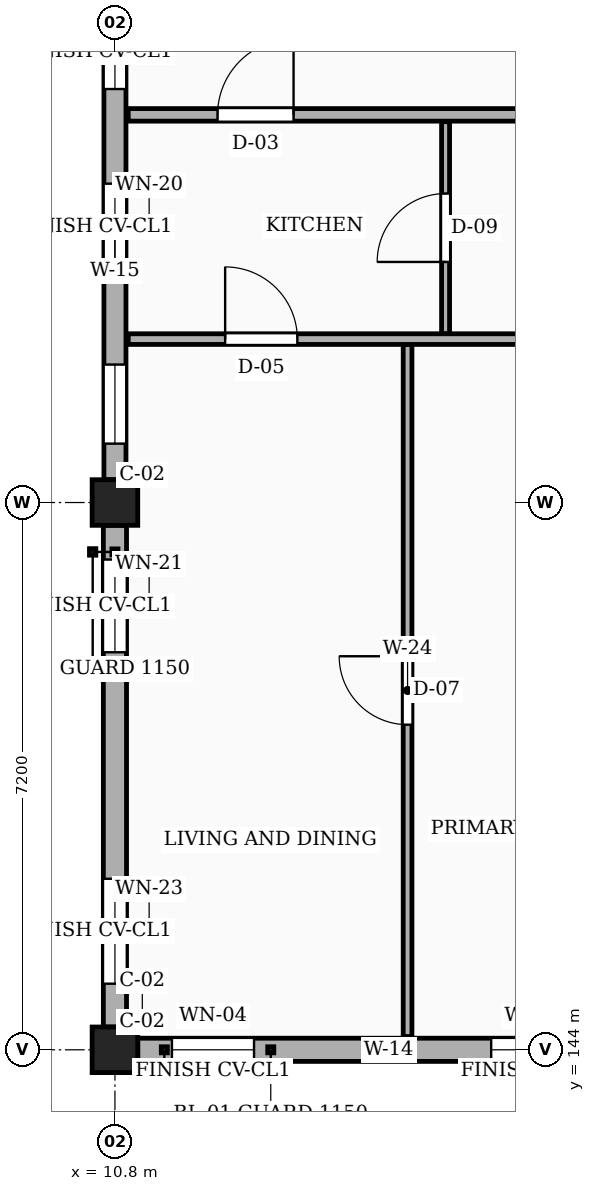
"""IFC4 building model, lengths in metres.
Left out: names, types, materials, properties, quantities, classifications, styles, units other than length and angle.
Written with IfcOpenShell. Run it as: python <this file> out.ifc"""

import sys

from ifc_helpers import new_model, si_unit, direction, frame, frame_2d, origin, origin_2d, place, context, subcontext, project, spatial, rectangle, extrude, element, fill, save


model = new_model("IFC4")
c1 = context("Model", 3, precision=1e-05, world=origin(), true_north=direction((0.0, 1.0)))
c2 = subcontext(c1, "Body", "Model", "MODEL_VIEW")
j1 = project(units=[si_unit("LENGTHUNIT", "METRE"), si_unit("PLANEANGLEUNIT", "RADIAN")], contexts=[c1])
p1 = place(None, origin())
s1 = spatial("IfcSite", under=j1, at=p1, CompositionType="ELEMENT")
p2 = place(p1, origin())
s2 = spatial("IfcBuilding", under=s1, at=p2, CompositionType="ELEMENT")
p3 = place(p2, frame((0.0, 0.0, 7.65)))
s3 = spatial("IfcBuildingStorey", under=s2, at=p3, CompositionType="ELEMENT", Elevation=7.65)
for number, where, z_axis, x_axis in (
    (1, (10.8, 144.0, 0.0), (0.0, 0.0, 1.0), (1.0, 0.0, 0.0)),
    (2, (10.8, 151.2, 0.0), (0.0, 0.0, 1.0), (1.0, 0.0, 0.0)),
):
    element("IfcColumn", number, at=place(p3, frame(where, z_axis=z_axis, x_axis=x_axis)), inside=s3, PredefinedType="COLUMN", context=c2, shape_type="SweptSolid", body=[
        extrude(rectangle(XDim=0.6, YDim=0.6, at=origin_2d()), origin(), (0.0, 0.0, 1.0), 3.15),
    ])
p4 = place(p3, frame((11.1, 144.0, 0.0), z_axis=(0.0, 0.0, 1.0), x_axis=(1.0, 0.0, 0.0)))
e3 = element("IfcWall", 3, at=p4, inside=s3, PredefinedType="SOLIDWALL", context=c2, shape_type="SweptSolid", body=[
    extrude(rectangle(XDim=6.6, YDim=0.305, at=frame_2d((3.3, 0.0))), origin(), (0.0, 0.0, 1.0), 2.455),
])
p5 = place(p4, frame((0.45, 0.0, 0.78)))
e4 = element("IfcOpeningElement", 4, at=p5, cuts=e3, PredefinedType="OPENING", context=c2, shape_type="SweptSolid", body=[
    extrude(rectangle(XDim=1.08, YDim=1.15, at=frame_2d((0.54, 0.575))), frame((0.0, 0.163, 0.0), z_axis=(0.0, -1.0, 0.0), x_axis=(1.0, 0.0, 0.0)), (0.0, 0.0, 1.0), 0.325),
])
p6 = place(p4, frame((4.65, 0.0, 0.78)))
e5 = element("IfcOpeningElement", 5, at=p6, cuts=e3, PredefinedType="OPENING", context=c2, shape_type="SweptSolid", body=[
    extrude(rectangle(XDim=1.24, YDim=1.15, at=frame_2d((0.62, 0.575))), frame((0.0, 0.163, 0.0), z_axis=(0.0, -1.0, 0.0), x_axis=(1.0, 0.0, 0.0)), (0.0, 0.0, 1.0), 0.325),
])
p7 = place(p3, frame((10.8, 158.1, 0.0), z_axis=(0.0, 0.0, 1.0), x_axis=(0.0, -1.0, 0.0)))
e6 = element("IfcWall", 6, at=p7, inside=s3, PredefinedType="SOLIDWALL", context=c2, shape_type="SweptSolid", body=[
    extrude(rectangle(XDim=6.6, YDim=0.29, at=frame_2d((3.3, 0.0))), origin(), (0.0, 0.0, 1.0), 2.455),
])
p8 = place(p7, frame((0.48, 0.0, 0.78)))
e7 = element("IfcOpeningElement", 7, at=p8, cuts=e6, PredefinedType="OPENING", context=c2, shape_type="SweptSolid", body=[
    extrude(rectangle(XDim=0.98, YDim=1.36, at=frame_2d((0.49, 0.68))), frame((0.0, 0.155, 0.0), z_axis=(0.0, -1.0, 0.0), x_axis=(1.0, 0.0, 0.0)), (0.0, 0.0, 1.0), 0.31),
])
p9 = place(p7, frame((2.705, 0.0, 0.78)))
e8 = element("IfcOpeningElement", 8, at=p9, cuts=e6, PredefinedType="OPENING", context=c2, shape_type="SweptSolid", body=[
    extrude(rectangle(XDim=1.14, YDim=1.36, at=frame_2d((0.57, 0.68))), frame((0.0, 0.155, 0.0), z_axis=(0.0, -1.0, 0.0), x_axis=(1.0, 0.0, 0.0)), (0.0, 0.0, 1.0), 0.31),
])
p10 = place(p7, frame((5.085, 0.0, 0.78)))
e9 = element("IfcOpeningElement", 9, at=p10, cuts=e6, PredefinedType="OPENING", context=c2, shape_type="SweptSolid", body=[
    extrude(rectangle(XDim=1.04, YDim=1.26, at=frame_2d((0.52, 0.63))), frame((0.0, 0.155, 0.0), z_axis=(0.0, -1.0, 0.0), x_axis=(1.0, 0.0, 0.0)), (0.0, 0.0, 1.0), 0.31),
])
p11 = place(p3, frame((10.8, 150.9, 0.0), z_axis=(0.0, 0.0, 1.0), x_axis=(0.0, -1.0, 0.0)))
e10 = element("IfcWall", 10, at=p11, inside=s3, PredefinedType="SOLIDWALL", context=c2, shape_type="SweptSolid", body=[
    extrude(rectangle(XDim=6.6, YDim=0.305, at=frame_2d((3.3, 0.0))), origin(), (0.0, 0.0, 1.0), 2.455),
])
p12 = place(p11, frame((0.45, 0.0, 0.78)))
e11 = element("IfcOpeningElement", 11, at=p12, cuts=e10, PredefinedType="OPENING", context=c2, shape_type="SweptSolid", body=[
    extrude(rectangle(XDim=1.22, YDim=1.36, at=frame_2d((0.61, 0.68))), frame((0.0, 0.163, 0.0), z_axis=(0.0, -1.0, 0.0), x_axis=(1.0, 0.0, 0.0)), (0.0, 0.0, 1.0), 0.325),
])
p13 = place(p11, frame((4.65, 0.0, 0.78)))
e12 = element("IfcOpeningElement", 12, at=p13, cuts=e10, PredefinedType="OPENING", context=c2, shape_type="SweptSolid", body=[
    extrude(rectangle(XDim=1.38, YDim=1.36, at=frame_2d((0.69, 0.68))), frame((0.0, 0.163, 0.0), z_axis=(0.0, -1.0, 0.0), x_axis=(1.0, 0.0, 0.0)), (0.0, 0.0, 1.0), 0.325),
])
p14 = place(p3, frame((10.975, 156.3, 0.0), z_axis=(0.0, 0.0, 1.0), x_axis=(1.0, 0.0, 0.0)))
e13 = element("IfcWall", 13, at=p14, inside=s3, PredefinedType="PARTITIONING", context=c2, shape_type="SweptSolid", body=[
    extrude(rectangle(XDim=7.005, YDim=0.165, at=frame_2d((3.502, 0.0))), origin(), (0.0, 0.0, 1.0), 2.32),
])
p15 = place(p14, frame((1.175, 0.0, 0.0)))
e14 = element("IfcOpeningElement", 14, at=p15, cuts=e13, PredefinedType="OPENING", context=c2, shape_type="SweptSolid", body=[
    extrude(rectangle(XDim=1.0, YDim=2.15, at=frame_2d((0.5, 1.075))), frame((0.0, 0.093, 0.0), z_axis=(0.0, -1.0, 0.0), x_axis=(1.0, 0.0, 0.0)), (0.0, 0.0, 1.0), 0.185),
])
p16 = place(p3, frame((14.65, 144.175, 0.0), z_axis=(0.0, 0.0, 1.0), x_axis=(0.0, 1.0, 0.0)))
e15 = element("IfcWall", 15, at=p16, inside=s3, PredefinedType="PARTITIONING", context=c2, shape_type="SweptSolid", body=[
    extrude(rectangle(XDim=9.105, YDim=0.115, at=frame_2d((4.552, 0.0))), origin(), (0.0, 0.0, 1.0), 2.32),
])
p17 = place(p16, frame((4.103, 0.0, 0.0)))
e16 = element("IfcOpeningElement", 16, at=p17, cuts=e15, PredefinedType="OPENING", context=c2, shape_type="SweptSolid", body=[
    extrude(rectangle(XDim=0.9, YDim=2.1, at=frame_2d((0.45, 1.05))), frame((0.0, 0.067, 0.0), z_axis=(0.0, -1.0, 0.0), x_axis=(1.0, 0.0, 0.0)), (0.0, 0.0, 1.0), 0.135),
])
p18 = place(p3, frame((15.15, 153.42, 0.0), z_axis=(0.0, 0.0, 1.0), x_axis=(0.0, 1.0, 0.0)))
e17 = element("IfcWall", 17, at=p18, inside=s3, PredefinedType="PARTITIONING", context=c2, shape_type="SweptSolid", body=[
    extrude(rectangle(XDim=2.79, YDim=0.105, at=frame_2d((1.395, 0.0))), origin(), (0.0, 0.0, 1.0), 2.32),
])
p19 = place(p18, frame((0.945, 0.0, 0.0)))
e18 = element("IfcOpeningElement", 18, at=p19, cuts=e17, PredefinedType="OPENING", context=c2, shape_type="SweptSolid", body=[
    extrude(rectangle(XDim=0.9, YDim=2.05, at=frame_2d((0.45, 1.025))), frame((0.0, 0.062, 0.0), z_axis=(0.0, -1.0, 0.0), x_axis=(1.0, 0.0, 0.0)), (0.0, 0.0, 1.0), 0.125),
])
p20 = place(p3, frame((10.975, 153.35, 0.0), z_axis=(0.0, 0.0, 1.0), x_axis=(1.0, 0.0, 0.0)))
e19 = element("IfcWall", 19, at=p20, inside=s3, PredefinedType="PARTITIONING", context=c2, shape_type="SweptSolid", body=[
    extrude(rectangle(XDim=6.885, YDim=0.14, at=frame_2d((3.442, 0.0))), origin(), (0.0, 0.0, 1.0), 2.32),
])
p21 = place(p20, frame((1.275, 0.0, 0.0)))
e20 = element("IfcOpeningElement", 20, at=p21, cuts=e19, PredefinedType="OPENING", context=c2, shape_type="SweptSolid", body=[
    extrude(rectangle(XDim=0.95, YDim=2.1, at=frame_2d((0.475, 1.05))), frame((0.0, 0.08, 0.0), z_axis=(0.0, -1.0, 0.0), x_axis=(1.0, 0.0, 0.0)), (0.0, 0.0, 1.0), 0.16),
])
p22 = place(p5, origin())
e21 = element("IfcWindow", 21, at=p22, inside=s3, PartitioningType="SINGLE_PANEL", PredefinedType="WINDOW", context=c2, shape_type="SweptSolid", body=[
    extrude(rectangle(XDim=1.08, YDim=1.15, at=frame_2d((0.54, 0.575))), frame((0.0, 0.03, 0.0), z_axis=(0.0, -1.0, 0.0), x_axis=(1.0, 0.0, 0.0)), (0.0, 0.0, 1.0), 0.06),
])
fill(e4, e21)
p23 = place(p6, origin())
e22 = element("IfcWindow", 22, at=p23, inside=s3, PartitioningType="SINGLE_PANEL", PredefinedType="WINDOW", context=c2, shape_type="SweptSolid", body=[
    extrude(rectangle(XDim=1.24, YDim=1.15, at=frame_2d((0.62, 0.575))), frame((0.0, 0.03, 0.0), z_axis=(0.0, -1.0, 0.0), x_axis=(1.0, 0.0, 0.0)), (0.0, 0.0, 1.0), 0.06),
])
fill(e5, e22)
p24 = place(p8, origin())
e23 = element("IfcWindow", 23, at=p24, inside=s3, PartitioningType="SINGLE_PANEL", PredefinedType="WINDOW", context=c2, shape_type="SweptSolid", body=[
    extrude(rectangle(XDim=0.98, YDim=1.36, at=frame_2d((0.49, 0.68))), frame((0.0, 0.03, 0.0), z_axis=(0.0, -1.0, 0.0), x_axis=(1.0, 0.0, 0.0)), (0.0, 0.0, 1.0), 0.06),
])
fill(e7, e23)
p25 = place(p9, origin())
e24 = element("IfcWindow", 24, at=p25, inside=s3, PartitioningType="SINGLE_PANEL", PredefinedType="WINDOW", context=c2, shape_type="SweptSolid", body=[
    extrude(rectangle(XDim=1.14, YDim=1.36, at=frame_2d((0.57, 0.68))), frame((0.0, 0.03, 0.0), z_axis=(0.0, -1.0, 0.0), x_axis=(1.0, 0.0, 0.0)), (0.0, 0.0, 1.0), 0.06),
])
fill(e8, e24)
p26 = place(p10, origin())
e25 = element("IfcWindow", 25, at=p26, inside=s3, PartitioningType="SINGLE_PANEL", PredefinedType="WINDOW", context=c2, shape_type="SweptSolid", body=[
    extrude(rectangle(XDim=1.04, YDim=1.26, at=frame_2d((0.52, 0.63))), frame((0.0, 0.03, 0.0), z_axis=(0.0, -1.0, 0.0), x_axis=(1.0, 0.0, 0.0)), (0.0, 0.0, 1.0), 0.06),
])
fill(e9, e25)
p27 = place(p12, origin())
e26 = element("IfcWindow", 26, at=p27, inside=s3, PartitioningType="SINGLE_PANEL", PredefinedType="WINDOW", context=c2, shape_type="SweptSolid", body=[
    extrude(rectangle(XDim=1.22, YDim=1.36, at=frame_2d((0.61, 0.68))), frame((0.0, 0.03, 0.0), z_axis=(0.0, -1.0, 0.0), x_axis=(1.0, 0.0, 0.0)), (0.0, 0.0, 1.0), 0.06),
])
fill(e11, e26)
p28 = place(p13, origin())
e27 = element("IfcWindow", 27, at=p28, inside=s3, PartitioningType="SINGLE_PANEL", PredefinedType="WINDOW", context=c2, shape_type="SweptSolid", body=[
    extrude(rectangle(XDim=1.38, YDim=1.36, at=frame_2d((0.69, 0.68))), frame((0.0, 0.03, 0.0), z_axis=(0.0, -1.0, 0.0), x_axis=(1.0, 0.0, 0.0)), (0.0, 0.0, 1.0), 0.06),
])
fill(e12, e27)
p29 = place(p15, origin())
e28 = element("IfcDoor", 28, at=p29, inside=s3, OperationType="SINGLE_SWING_RIGHT", PredefinedType="DOOR", context=c2, shape_type="SweptSolid", body=[
    extrude(rectangle(XDim=1.0, YDim=2.15, at=frame_2d((0.5, 1.075))), frame((0.0, 0.025, 0.0), z_axis=(0.0, -1.0, 0.0), x_axis=(1.0, 0.0, 0.0)), (0.0, 0.0, 1.0), 0.05),
])
fill(e14, e28)
p30 = place(p17, origin())
e29 = element("IfcDoor", 29, at=p30, inside=s3, OperationType="SINGLE_SWING_RIGHT", PredefinedType="DOOR", context=c2, shape_type="SweptSolid", body=[
    extrude(rectangle(XDim=0.9, YDim=2.1, at=frame_2d((0.45, 1.05))), frame((0.0, 0.025, 0.0), z_axis=(0.0, -1.0, 0.0), x_axis=(1.0, 0.0, 0.0)), (0.0, 0.0, 1.0), 0.05),
])
fill(e16, e29)
p31 = place(p19, origin())
e30 = element("IfcDoor", 30, at=p31, inside=s3, OperationType="SINGLE_SWING_LEFT", PredefinedType="DOOR", context=c2, shape_type="SweptSolid", body=[
    extrude(rectangle(XDim=0.9, YDim=2.05, at=frame_2d((0.45, 1.025))), frame((0.0, 0.025, 0.0), z_axis=(0.0, -1.0, 0.0), x_axis=(1.0, 0.0, 0.0)), (0.0, 0.0, 1.0), 0.05),
])
fill(e18, e30)
p32 = place(p21, origin())
e31 = element("IfcDoor", 31, at=p32, inside=s3, OperationType="SINGLE_SWING_LEFT", PredefinedType="DOOR", context=c2, shape_type="SweptSolid", body=[
    extrude(rectangle(XDim=0.95, YDim=2.1, at=frame_2d((0.475, 1.05))), frame((0.0, 0.025, 0.0), z_axis=(0.0, -1.0, 0.0), x_axis=(1.0, 0.0, 0.0)), (0.0, 0.0, 1.0), 0.05),
])
fill(e20, e31)
save(model, sys.argv[1])
